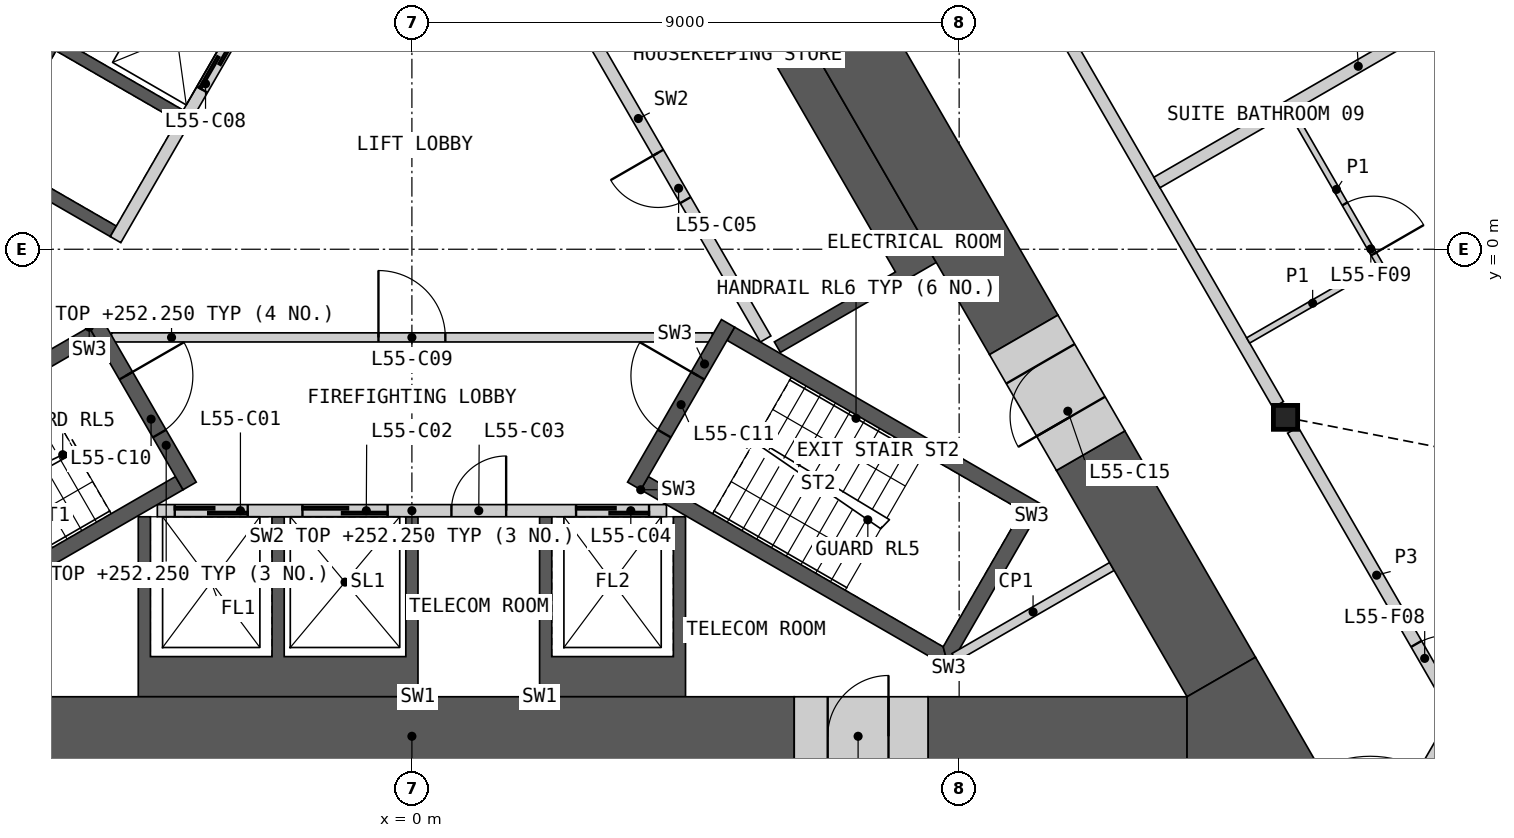
"""IFC4 building model, lengths in metres.
Left out: names, types, materials, properties, quantities, classifications, styles, units other than length and angle.
Written with IfcOpenShell. Run it as: python <this file> out.ifc"""

import sys

from ifc_helpers import new_model, si_unit, direction, frame, frame_2d, origin, origin_2d, place, context, subcontext, project, spatial, polyline, rectangle, i_section, outline, extrude, element, fill, save


model = new_model("IFC4")
c1 = context("Model", 3, precision=1e-05, world=origin(), true_north=direction((0.0, 1.0)))
c2 = subcontext(c1, "Body", "Model", "MODEL_VIEW")
j1 = project(units=[si_unit("LENGTHUNIT", "METRE"), si_unit("PLANEANGLEUNIT", "RADIAN")], contexts=[c1])
p1 = place(None, origin())
s1 = spatial("IfcSite", under=j1, at=p1, CompositionType="ELEMENT")
p2 = place(p1, origin())
s2 = spatial("IfcBuilding", under=s1, at=p2, CompositionType="ELEMENT")
p3 = place(p2, frame((0.0, 0.0, 249.0)))
s3 = spatial("IfcBuildingStorey", under=s2, at=p3, CompositionType="ELEMENT", Elevation=249.0)
p4 = place(p3, frame((14.368, -2.765, 0.0), z_axis=(0.0, 0.0, 1.0), x_axis=(1.0, 0.0, 0.0)))
e1 = element("IfcColumn", 1, at=p4, inside=s3, PredefinedType="COLUMN", context=c2, shape_type="SweptSolid", body=[
    extrude(i_section(OverallWidth=0.399, OverallDepth=0.393, WebThickness=0.023, FlangeThickness=0.037, at=origin_2d()), origin(), (0.0, 0.0, 1.0), 3.6),
])
p5 = place(p3, origin())
e2 = element("IfcWall", 2, at=p5, inside=s3, PredefinedType="SHEAR", context=c2, shape_type="SweptSolid", body=[
    extrude(outline(polyline([(0.1, -7.36), (-4.5, -7.36), (-4.5, -4.4), (-4.3, -4.4), (-4.3, -6.7), (-2.3, -6.7), (-2.3, -4.4), (-2.1, -4.4), (-2.1, -6.7), (-0.1, -6.7), (-0.1, -4.4), (0.1, -4.4), (0.1, -7.36)])), origin(), (0.0, 0.0, 1.0), 3.25),
])
p6 = place(p3, origin())
e3 = element("IfcWall", 3, at=p6, inside=s3, PredefinedType="SHEAR", context=c2, shape_type="SweptSolid", body=[
    extrude(outline(polyline([(2.1, -7.36), (2.1, -4.4), (2.3, -4.4), (2.3, -6.7), (4.3, -6.7), (4.3, -4.4), (4.5, -4.4), (4.5, -7.36), (2.1, -7.36)])), origin(), (0.0, 0.0, 1.0), 3.25),
])
p7 = place(p3, frame((-4.187, -4.3, 0.0), z_axis=(0.0, 0.0, 1.0), x_axis=(1.0, 0.0, 0.0)))
e4 = element("IfcWall", 4, at=p7, inside=s3, PredefinedType="SOLIDWALL", context=c2, shape_type="SweptSolid", body=[
    extrude(rectangle(XDim=8.373, YDim=0.2, at=frame_2d((4.187, 0.0))), origin(), (0.0, 0.0, 1.0), 3.25),
])
p8 = place(p7, frame((0.287, 0.0, 0.0)))
e5 = element("IfcOpeningElement", 5, at=p8, cuts=e4, PredefinedType="OPENING", context=c2, shape_type="SweptSolid", body=[
    extrude(rectangle(XDim=1.2, YDim=2.1, at=frame_2d((0.6, 1.05))), frame((0.0, 0.11, 0.0), z_axis=(0.0, -1.0, 0.0), x_axis=(1.0, 0.0, 0.0)), (0.0, 0.0, 1.0), 0.22),
])
p9 = place(p7, frame((2.387, 0.0, 0.0)))
e6 = element("IfcOpeningElement", 6, at=p9, cuts=e4, PredefinedType="OPENING", context=c2, shape_type="SweptSolid", body=[
    extrude(rectangle(XDim=1.4, YDim=2.1, at=frame_2d((0.7, 1.05))), frame((0.0, 0.11, 0.0), z_axis=(0.0, -1.0, 0.0), x_axis=(1.0, 0.0, 0.0)), (0.0, 0.0, 1.0), 0.22),
])
p10 = place(p7, frame((4.837, 0.0, 0.0)))
e7 = element("IfcOpeningElement", 7, at=p10, cuts=e4, PredefinedType="OPENING", context=c2, shape_type="SweptSolid", body=[
    extrude(rectangle(XDim=0.9, YDim=2.1, at=frame_2d((0.45, 1.05))), frame((0.0, 0.11, 0.0), z_axis=(0.0, -1.0, 0.0), x_axis=(1.0, 0.0, 0.0)), (0.0, 0.0, 1.0), 0.22),
])
p11 = place(p7, frame((6.887, 0.0, 0.0)))
e8 = element("IfcOpeningElement", 8, at=p11, cuts=e4, PredefinedType="OPENING", context=c2, shape_type="SweptSolid", body=[
    extrude(rectangle(XDim=1.2, YDim=2.1, at=frame_2d((0.6, 1.05))), frame((0.0, 0.11, 0.0), z_axis=(0.0, -1.0, 0.0), x_axis=(1.0, 0.0, 0.0)), (0.0, 0.0, 1.0), 0.22),
])
p12 = place(p3, origin())
e9 = element("IfcWall", 9, at=p12, inside=s3, PredefinedType="SHEAR", context=c2, shape_type="SweptSolid", body=[
    extrude(outline(polyline([(4.124, 7.577), (8.624, -0.217), (8.231, -0.444), (6.061, -1.697), (5.96, -1.524), (7.952, -0.374), (4.752, 5.169), (2.76, 4.019), (2.66, 4.192), (4.652, 5.342), (3.652, 7.074), (1.66, 5.924), (1.561, 6.097), (3.731, 7.35), (4.124, 7.577)])), origin(), (0.0, 0.0, 1.0), 3.25),
])
p13 = place(p3, frame((5.817, -1.476, 0.0), z_axis=(0.0, 0.0, 1.0), x_axis=(-0.500002616675, 0.866023893041, 0.0)))
e10 = element("IfcWall", 10, at=p13, inside=s3, PredefinedType="SOLIDWALL", context=c2, shape_type="SweptSolid", body=[
    extrude(rectangle(XDim=8.373, YDim=0.2, at=frame_2d((4.187, 0.0))), origin(), (0.0, 0.0, 1.0), 3.25),
])
p14 = place(p13, frame((2.637, 0.0, 0.0)))
e11 = element("IfcOpeningElement", 11, at=p14, cuts=e10, PredefinedType="OPENING", context=c2, shape_type="SweptSolid", body=[
    extrude(rectangle(XDim=0.9, YDim=2.1, at=frame_2d((0.45, 1.05))), frame((0.0, 0.11, 0.0), z_axis=(0.0, -1.0, 0.0), x_axis=(1.0, 0.0, 0.0)), (0.0, 0.0, 1.0), 0.22),
])
p15 = place(p13, frame((6.937, 0.0, 0.0)))
e12 = element("IfcOpeningElement", 12, at=p15, cuts=e10, PredefinedType="OPENING", context=c2, shape_type="SweptSolid", body=[
    extrude(rectangle(XDim=1.1, YDim=2.1, at=frame_2d((0.55, 1.05))), frame((0.0, 0.11, 0.0), z_axis=(0.0, -1.0, 0.0), x_axis=(1.0, 0.0, 0.0)), (0.0, 0.0, 1.0), 0.22),
])
p16 = place(p3, origin())
e13 = element("IfcWall", 13, at=p16, inside=s3, PredefinedType="SHEAR", context=c2, shape_type="SweptSolid", body=[
    extrude(outline(polyline([(-7.524, 1.688), (-4.124, 7.577), (-3.731, 7.35), (-1.561, 6.097), (-1.66, 5.924), (-3.652, 7.074), (-4.652, 5.342), (-2.66, 4.192), (-2.76, 4.019), (-4.752, 5.169), (-5.752, 3.437), (-3.76, 2.287), (-3.861, 2.113), (-5.852, 3.263), (-6.852, 1.531), (-4.861, 0.381), (-4.96, 0.208), (-7.131, 1.461), (-7.524, 1.688)])), origin(), (0.0, 0.0, 1.0), 3.25),
])
p17 = place(p3, frame((-1.631, 5.776, 0.0), z_axis=(0.0, 0.0, 1.0), x_axis=(-0.499992876559, -0.866029516466, 0.0)))
e14 = element("IfcWall", 14, at=p17, inside=s3, PredefinedType="SOLIDWALL", context=c2, shape_type="SweptSolid", body=[
    extrude(rectangle(XDim=6.486, YDim=0.2, at=frame_2d((3.243, 0.0))), origin(), (0.0, 0.0, 1.0), 3.25),
])
p18 = place(p17, frame((0.337, 0.0, 0.0)))
e15 = element("IfcOpeningElement", 15, at=p18, cuts=e14, PredefinedType="OPENING", context=c2, shape_type="SweptSolid", body=[
    extrude(rectangle(XDim=1.1, YDim=2.1, at=frame_2d((0.55, 1.05))), frame((0.0, 0.11, 0.0), z_axis=(0.0, -1.0, 0.0), x_axis=(1.0, 0.0, 0.0)), (0.0, 0.0, 1.0), 0.22),
])
p19 = place(p17, frame((2.537, 0.0, 0.0)))
e16 = element("IfcOpeningElement", 16, at=p19, cuts=e14, PredefinedType="OPENING", context=c2, shape_type="SweptSolid", body=[
    extrude(rectangle(XDim=1.1, YDim=2.1, at=frame_2d((0.55, 1.05))), frame((0.0, 0.11, 0.0), z_axis=(0.0, -1.0, 0.0), x_axis=(1.0, 0.0, 0.0)), (0.0, 0.0, 1.0), 0.22),
])
p20 = place(p3, frame((-4.941, -1.45, 0.0), z_axis=(0.0, 0.0, 1.0), x_axis=(1.0, 0.0, 0.0)))
e17 = element("IfcWall", 17, at=p20, inside=s3, PredefinedType="PARTITIONING", context=c2, shape_type="SweptSolid", body=[
    extrude(rectangle(XDim=9.882, YDim=0.15, at=frame_2d((4.941, 0.0))), origin(), (0.0, 0.0, 1.0), 3.25),
])
p21 = place(p20, frame((4.391, 0.0, 0.0)))
e18 = element("IfcOpeningElement", 18, at=p21, cuts=e17, PredefinedType="OPENING", context=c2, shape_type="SweptSolid", body=[
    extrude(rectangle(XDim=1.1, YDim=2.1, at=frame_2d((0.55, 1.05))), frame((0.0, 0.085, 0.0), z_axis=(0.0, -1.0, 0.0), x_axis=(1.0, 0.0, 0.0)), (0.0, 0.0, 1.0), 0.17),
])
p22 = place(p3, origin())
e19 = element("IfcWall", 19, at=p22, inside=s3, PredefinedType="SHEAR", context=c2, shape_type="SweptSolid", body=[
    extrude(outline(polyline([(-5.307, -1.281), (-10.374, -4.206), (-10.032, -4.298), (-5.182, -1.498), (-5.307, -1.281)])), origin(), (0.0, 0.0, 1.0), 3.25),
])
p23 = place(p3, origin())
e20 = element("IfcWall", 20, at=p23, inside=s3, PredefinedType="SHEAR", context=c2, shape_type="SweptSolid", body=[
    extrude(outline(polyline([(-8.738, -6.539), (-8.83, -6.881), (-3.763, -3.956), (-3.888, -3.739), (-8.738, -6.539)])), origin(), (0.0, 0.0, 1.0), 3.25),
])
p24 = place(p3, frame((-5.199, -1.219, 0.0), z_axis=(0.0, 0.0, 1.0), x_axis=(0.499982516597, -0.866035497597, 0.0)))
e21 = element("IfcWall", 21, at=p24, inside=s3, PredefinedType="SHEAR", context=c2, shape_type="SweptSolid", body=[
    extrude(rectangle(XDim=3.088, YDim=0.25, at=frame_2d((1.544, 0.0))), origin(), (0.0, 0.0, 1.0), 3.25),
])
p25 = place(p24, frame((0.994, 0.0, 0.0)))
e22 = element("IfcOpeningElement", 22, at=p25, cuts=e21, PredefinedType="OPENING", context=c2, shape_type="SweptSolid", body=[
    extrude(rectangle(XDim=1.1, YDim=2.1, at=frame_2d((0.55, 1.05))), frame((0.0, 0.135, 0.0), z_axis=(0.0, -1.0, 0.0), x_axis=(1.0, 0.0, 0.0)), (0.0, 0.0, 1.0), 0.27),
])
p26 = place(p3, origin())
e23 = element("IfcWall", 23, at=p26, inside=s3, PredefinedType="SHEAR", context=c2, shape_type="SweptSolid", body=[
    extrude(outline(polyline([(3.763, -3.956), (8.83, -6.881), (8.738, -6.539), (3.888, -3.739), (3.763, -3.956)])), origin(), (0.0, 0.0, 1.0), 3.25),
])
p27 = place(p3, origin())
e24 = element("IfcWall", 24, at=p27, inside=s3, PredefinedType="SHEAR", context=c2, shape_type="SweptSolid", body=[
    extrude(outline(polyline([(8.83, -6.881), (10.374, -4.206), (10.032, -4.298), (8.738, -6.539), (8.83, -6.881)])), origin(), (0.0, 0.0, 1.0), 3.25),
])
p28 = place(p3, origin())
e25 = element("IfcWall", 25, at=p28, inside=s3, PredefinedType="SHEAR", context=c2, shape_type="SweptSolid", body=[
    extrude(outline(polyline([(10.032, -4.298), (10.374, -4.206), (5.307, -1.281), (5.182, -1.498), (10.032, -4.298)])), origin(), (0.0, 0.0, 1.0), 3.25),
])
p29 = place(p3, frame((3.655, -3.893, 0.0), z_axis=(0.0, 0.0, 1.0), x_axis=(0.499982516597, 0.866035497597, 0.0)))
e26 = element("IfcWall", 26, at=p29, inside=s3, PredefinedType="SHEAR", context=c2, shape_type="SweptSolid", body=[
    extrude(rectangle(XDim=3.088, YDim=0.25, at=frame_2d((1.544, 0.0))), origin(), (0.0, 0.0, 1.0), 3.25),
])
p30 = place(p29, frame((0.994, 0.0, 0.0)))
e27 = element("IfcOpeningElement", 27, at=p30, cuts=e26, PredefinedType="OPENING", context=c2, shape_type="SweptSolid", body=[
    extrude(rectangle(XDim=1.1, YDim=2.1, at=frame_2d((0.55, 1.05))), frame((0.0, 0.135, 0.0), z_axis=(0.0, -1.0, 0.0), x_axis=(1.0, 0.0, 0.0)), (0.0, 0.0, 1.0), 0.27),
])
p31 = place(p3, frame((11.511, -5.218, 0.0), z_axis=(0.0, 0.0, 1.0), x_axis=(-0.866045649925, -0.499964931016, 0.0)))
e28 = element("IfcWall", 28, at=p31, inside=s3, PredefinedType="PARTITIONING", context=c2, shape_type="SweptSolid", body=[
    extrude(rectangle(XDim=2.992, YDim=0.15, at=frame_2d((1.496, 0.0))), origin(), (0.0, 0.0, 1.0), 3.25),
])
p32 = place(p3, frame((-6.288, -8.01, 0.0), z_axis=(0.0, 0.0, 1.0), x_axis=(1.0, 0.0, 0.0)))
e29 = element("IfcWall", 29, at=p32, inside=s3, PredefinedType="SHEAR", context=c2, shape_type="SweptSolid", body=[
    extrude(rectangle(XDim=12.576, YDim=1.3, at=frame_2d((6.288, 0.0))), origin(), (0.0, 0.0, 1.0), 3.25),
])
p33 = place(p3, frame((8.488, -8.01, 0.0), z_axis=(0.0, 0.0, 1.0), x_axis=(1.0, 0.0, 0.0)))
e30 = element("IfcWall", 30, at=p33, inside=s3, PredefinedType="SHEAR", context=c2, shape_type="SweptSolid", body=[
    extrude(rectangle(XDim=4.26, YDim=1.3, at=frame_2d((2.13, 0.0))), origin(), (0.0, 0.0, 1.0), 3.25),
])
p34 = place(p3, frame((10.062, -1.408, 0.0), z_axis=(0.0, 0.0, 1.0), x_axis=(-0.500000545805, 0.866025088663, 0.0)))
e31 = element("IfcWall", 31, at=p34, inside=s3, PredefinedType="SHEAR", context=c2, shape_type="SweptSolid", body=[
    extrude(rectangle(XDim=12.539, YDim=1.3, at=frame_2d((6.27, 0.0))), origin(), (0.0, 0.0, 1.0), 3.25),
])
p35 = place(p3, frame((13.311, -7.035, 0.0), z_axis=(0.0, 0.0, 1.0), x_axis=(-0.500012574659, 0.86601814368, 0.0)))
e32 = element("IfcWall", 32, at=p35, inside=s3, PredefinedType="SHEAR", context=c2, shape_type="SweptSolid", body=[
    extrude(rectangle(XDim=4.298, YDim=1.3, at=frame_2d((2.149, 0.0))), origin(), (0.0, 0.0, 1.0), 3.25),
])
p36 = place(p3, frame((-3.812, 9.418, 0.0), z_axis=(0.0, 0.0, 1.0), x_axis=(-0.499995037753, -0.86602826872, 0.0)))
e33 = element("IfcWall", 33, at=p36, inside=s3, PredefinedType="SHEAR", context=c2, shape_type="SweptSolid", body=[
    extrude(rectangle(XDim=8.451, YDim=1.3, at=frame_2d((4.225, 0.0))), origin(), (0.0, 0.0, 1.0), 3.25),
])
p37 = place(p3, origin())
e34 = element("IfcWall", 34, at=p37, inside=s3, PredefinedType="SHEAR", context=c2, shape_type="SweptSolid", body=[
    extrude(outline(polyline([(12.748, -8.66), (12.748, -7.36), (13.874, -6.71), (15.0, -8.66), (12.748, -8.66)])), origin(), (0.0, 0.0, 1.0), 3.25),
])
p38 = place(p3, frame((6.288, -8.01, 0.0), z_axis=(0.0, 0.0, 1.0), x_axis=(1.0, 0.0, 0.0)))
e35 = element("IfcWall", 35, at=p38, inside=s3, PredefinedType="SHEAR", context=c2, shape_type="SweptSolid", body=[
    extrude(rectangle(XDim=2.2, YDim=1.3, at=frame_2d((1.1, 0.0))), origin(), (0.0, 0.0, 1.0), 3.25),
])
p39 = place(p38, frame((0.55, 0.0, 0.0)))
e36 = element("IfcOpeningElement", 36, at=p39, cuts=e35, PredefinedType="OPENING", context=c2, shape_type="SweptSolid", body=[
    extrude(rectangle(XDim=1.0, YDim=2.1, at=frame_2d((0.5, 1.05))), frame((0.0, 0.66, 0.0), z_axis=(0.0, -1.0, 0.0), x_axis=(1.0, 0.0, 0.0)), (0.0, 0.0, 1.0), 1.32),
])
p40 = place(p3, frame((11.163, -3.313, 0.0), z_axis=(0.0, 0.0, 1.0), x_axis=(-0.50002983664, 0.866008176907, 0.0)))
e37 = element("IfcWall", 37, at=p40, inside=s3, PredefinedType="SHEAR", context=c2, shape_type="SweptSolid", body=[
    extrude(rectangle(XDim=2.2, YDim=1.3, at=frame_2d((1.1, 0.0))), origin(), (0.0, 0.0, 1.0), 3.25),
])
p41 = place(p40, frame((0.65, 0.0, 0.0)))
e38 = element("IfcOpeningElement", 38, at=p41, cuts=e37, PredefinedType="OPENING", context=c2, shape_type="SweptSolid", body=[
    extrude(rectangle(XDim=1.0, YDim=2.1, at=frame_2d((0.5, 1.05))), frame((0.0, 0.66, 0.0), z_axis=(0.0, -1.0, 0.0), x_axis=(1.0, 0.0, 0.0)), (0.0, 0.0, 1.0), 1.32),
])
p42 = place(p3, frame((9.699, 5.321, 0.0), z_axis=(0.0, 0.0, 1.0), x_axis=(0.49998193945, -0.866035830797, 0.0)))
e39 = element("IfcWall", 39, at=p42, inside=s3, PredefinedType="PARTITIONING", context=c2, shape_type="SweptSolid", body=[
    extrude(rectangle(XDim=9.094, YDim=0.2, at=frame_2d((4.547, 0.0))), origin(), (0.0, 0.0, 1.0), 3.25),
])
p43 = place(p3, frame((14.489, -2.975, 0.0), z_axis=(0.0, 0.0, 1.0), x_axis=(0.500017753321, -0.866015153657, 0.0)))
e40 = element("IfcWall", 40, at=p43, inside=s3, PredefinedType="PARTITIONING", context=c2, shape_type="SweptSolid", body=[
    extrude(rectangle(XDim=5.51, YDim=0.2, at=frame_2d((2.755, 0.0))), origin(), (0.0, 0.0, 1.0), 3.25),
])
p44 = place(p43, frame((4.06, 0.0, 0.0)))
e41 = element("IfcOpeningElement", 41, at=p44, cuts=e40, PredefinedType="OPENING", context=c2, shape_type="SweptSolid", body=[
    extrude(rectangle(XDim=1.1, YDim=2.1, at=frame_2d((0.55, 1.05))), frame((0.0, 0.11, 0.0), z_axis=(0.0, -1.0, 0.0), x_axis=(1.0, 0.0, 0.0)), (0.0, 0.0, 1.0), 0.22),
])
p45 = place(p3, frame((15.231, -11.06, 0.0), z_axis=(0.0, 0.0, 1.0), x_axis=(0.499961815444, 0.866047448526, 0.0)))
e42 = element("IfcWall", 42, at=p45, inside=s3, PredefinedType="PARTITIONING", context=c2, shape_type="SweptSolid", body=[
    extrude(rectangle(XDim=3.826, YDim=0.2, at=frame_2d((1.913, 0.0))), origin(), (0.0, 0.0, 1.0), 3.25),
])
p46 = place(p45, frame((1.064, 0.0, 0.0)))
e43 = element("IfcOpeningElement", 43, at=p46, cuts=e42, PredefinedType="OPENING", context=c2, shape_type="SweptSolid", body=[
    extrude(rectangle(XDim=1.8, YDim=2.1, at=frame_2d((0.9, 1.05))), frame((0.0, 0.11, 0.0), z_axis=(0.0, -1.0, 0.0), x_axis=(1.0, 0.0, 0.0)), (0.0, 0.0, 1.0), 0.22),
])
p47 = place(p3, frame((12.253, 1.098, 0.0), z_axis=(0.0, 0.0, 1.0), x_axis=(0.866026077102, 0.499998833779, 0.0)))
e44 = element("IfcWall", 44, at=p47, inside=s3, PredefinedType="PARTITIONING", context=c2, shape_type="SweptSolid", body=[
    extrude(rectangle(XDim=7.646, YDim=0.2, at=frame_2d((3.823, 0.0))), origin(), (0.0, 0.0, 1.0), 2.404),
])
p48 = place(p3, frame((14.468, 2.261, 0.0), z_axis=(0.0, 0.0, 1.0), x_axis=(0.500037662692, -0.866003658127, 0.0)))
e45 = element("IfcWall", 45, at=p48, inside=s3, PredefinedType="PARTITIONING", context=c2, shape_type="SweptSolid", body=[
    extrude(rectangle(XDim=2.95, YDim=0.1, at=frame_2d((1.475, 0.0))), origin(), (0.0, 0.0, 1.0), 2.404),
])
p49 = place(p48, frame((1.75, 0.0, 0.0)))
e46 = element("IfcOpeningElement", 46, at=p49, cuts=e45, PredefinedType="OPENING", context=c2, shape_type="SweptSolid", body=[
    extrude(rectangle(XDim=0.95, YDim=2.1, at=frame_2d((0.475, 1.05))), frame((0.0, 0.06, 0.0), z_axis=(0.0, -1.0, 0.0), x_axis=(1.0, 0.0, 0.0)), (0.0, 0.0, 1.0), 0.12),
])
p50 = place(p3, frame((13.753, -1.5, 0.0), z_axis=(0.0, 0.0, 1.0), x_axis=(0.866014668023, 0.500018594424, 0.0)))
e47 = element("IfcWall", 47, at=p50, inside=s3, PredefinedType="PARTITIONING", context=c2, shape_type="SweptSolid", body=[
    extrude(rectangle(XDim=2.45, YDim=0.1, at=frame_2d((1.225, 0.0))), origin(), (0.0, 0.0, 1.0), 2.404),
])
p51 = place(p8, origin())
e48 = element("IfcDoor", 48, at=p51, inside=s3, OperationType="SLIDING_TO_LEFT", PredefinedType="DOOR", context=c2, shape_type="SweptSolid", body=[
    extrude(rectangle(XDim=1.2, YDim=2.1, at=frame_2d((0.6, 1.05))), frame((0.0, 0.025, 0.0), z_axis=(0.0, -1.0, 0.0), x_axis=(1.0, 0.0, 0.0)), (0.0, 0.0, 1.0), 0.05),
])
fill(e5, e48)
p52 = place(p9, origin())
e49 = element("IfcDoor", 49, at=p52, inside=s3, OperationType="SLIDING_TO_LEFT", PredefinedType="DOOR", context=c2, shape_type="SweptSolid", body=[
    extrude(rectangle(XDim=1.4, YDim=2.1, at=frame_2d((0.7, 1.05))), frame((0.0, 0.025, 0.0), z_axis=(0.0, -1.0, 0.0), x_axis=(1.0, 0.0, 0.0)), (0.0, 0.0, 1.0), 0.05),
])
fill(e6, e49)
p53 = place(p10, origin())
e50 = element("IfcDoor", 50, at=p53, inside=s3, OperationType="SINGLE_SWING_RIGHT", PredefinedType="DOOR", context=c2, shape_type="SweptSolid", body=[
    extrude(rectangle(XDim=0.9, YDim=2.1, at=frame_2d((0.45, 1.05))), frame((0.0, 0.025, 0.0), z_axis=(0.0, -1.0, 0.0), x_axis=(1.0, 0.0, 0.0)), (0.0, 0.0, 1.0), 0.05),
])
fill(e7, e50)
p54 = place(p11, origin())
e51 = element("IfcDoor", 51, at=p54, inside=s3, OperationType="SLIDING_TO_LEFT", PredefinedType="DOOR", context=c2, shape_type="SweptSolid", body=[
    extrude(rectangle(XDim=1.2, YDim=2.1, at=frame_2d((0.6, 1.05))), frame((0.0, 0.025, 0.0), z_axis=(0.0, -1.0, 0.0), x_axis=(1.0, 0.0, 0.0)), (0.0, 0.0, 1.0), 0.05),
])
fill(e8, e51)
p55 = place(p14, origin())
e52 = element("IfcDoor", 52, at=p55, inside=s3, OperationType="SINGLE_SWING_RIGHT", PredefinedType="DOOR", context=c2, shape_type="SweptSolid", body=[
    extrude(rectangle(XDim=0.9, YDim=2.1, at=frame_2d((0.45, 1.05))), frame((0.0, 0.025, 0.0), z_axis=(0.0, -1.0, 0.0), x_axis=(1.0, 0.0, 0.0)), (0.0, 0.0, 1.0), 0.05),
])
fill(e11, e52)
p56 = place(p19, origin())
e53 = element("IfcDoor", 53, at=p56, inside=s3, OperationType="SLIDING_TO_LEFT", PredefinedType="DOOR", context=c2, shape_type="SweptSolid", body=[
    extrude(rectangle(XDim=1.1, YDim=2.1, at=frame_2d((0.55, 1.05))), frame((0.0, 0.025, 0.0), z_axis=(0.0, -1.0, 0.0), x_axis=(1.0, 0.0, 0.0)), (0.0, 0.0, 1.0), 0.05),
])
fill(e16, e53)
p57 = place(p21, origin())
e54 = element("IfcDoor", 54, at=p57, inside=s3, OperationType="SINGLE_SWING_LEFT", PredefinedType="DOOR", context=c2, shape_type="SweptSolid", body=[
    extrude(rectangle(XDim=1.1, YDim=2.1, at=frame_2d((0.55, 1.05))), frame((0.0, 0.025, 0.0), z_axis=(0.0, -1.0, 0.0), x_axis=(1.0, 0.0, 0.0)), (0.0, 0.0, 1.0), 0.05),
])
fill(e18, e54)
p58 = place(p25, origin())
e55 = element("IfcDoor", 55, at=p58, inside=s3, OperationType="SINGLE_SWING_LEFT", PredefinedType="DOOR", context=c2, shape_type="SweptSolid", body=[
    extrude(rectangle(XDim=1.1, YDim=2.1, at=frame_2d((0.55, 1.05))), frame((0.0, 0.025, 0.0), z_axis=(0.0, -1.0, 0.0), x_axis=(1.0, 0.0, 0.0)), (0.0, 0.0, 1.0), 0.05),
])
fill(e22, e55)
p59 = place(p30, origin())
e56 = element("IfcDoor", 56, at=p59, inside=s3, OperationType="SINGLE_SWING_RIGHT", PredefinedType="DOOR", context=c2, shape_type="SweptSolid", body=[
    extrude(rectangle(XDim=1.1, YDim=2.1, at=frame_2d((0.55, 1.05))), frame((0.0, 0.025, 0.0), z_axis=(0.0, -1.0, 0.0), x_axis=(1.0, 0.0, 0.0)), (0.0, 0.0, 1.0), 0.05),
])
fill(e27, e56)
p60 = place(p39, origin())
e57 = element("IfcDoor", 57, at=p60, inside=s3, OperationType="SINGLE_SWING_RIGHT", PredefinedType="DOOR", context=c2, shape_type="SweptSolid", body=[
    extrude(rectangle(XDim=1.0, YDim=2.1, at=frame_2d((0.5, 1.05))), frame((0.0, 0.405, 0.0), z_axis=(0.0, -1.0, 0.0), x_axis=(1.0, 0.0, 0.0)), (0.0, 0.0, 1.0), 0.05),
])
fill(e36, e57)
p61 = place(p41, origin())
e58 = element("IfcDoor", 58, at=p61, inside=s3, OperationType="SINGLE_SWING_LEFT", PredefinedType="DOOR", context=c2, shape_type="SweptSolid", body=[
    extrude(rectangle(XDim=1.0, YDim=2.1, at=frame_2d((0.5, 1.05))), frame((0.0, 0.405, 0.0), z_axis=(0.0, -1.0, 0.0), x_axis=(1.0, 0.0, 0.0)), (0.0, 0.0, 1.0), 0.05),
])
fill(e38, e58)
p62 = place(p44, origin())
e59 = element("IfcDoor", 59, at=p62, inside=s3, OperationType="SINGLE_SWING_RIGHT", PredefinedType="DOOR", context=c2, shape_type="SweptSolid", body=[
    extrude(rectangle(XDim=1.1, YDim=2.1, at=frame_2d((0.55, 1.05))), frame((0.0, 0.025, 0.0), z_axis=(0.0, -1.0, 0.0), x_axis=(1.0, 0.0, 0.0)), (0.0, 0.0, 1.0), 0.05),
])
fill(e41, e59)
p63 = place(p49, origin())
e60 = element("IfcDoor", 60, at=p63, inside=s3, OperationType="SINGLE_SWING_RIGHT", PredefinedType="DOOR", context=c2, shape_type="SweptSolid", body=[
    extrude(rectangle(XDim=0.95, YDim=2.1, at=frame_2d((0.475, 1.05))), frame((0.0, 0.025, 0.0), z_axis=(0.0, -1.0, 0.0), x_axis=(1.0, 0.0, 0.0)), (0.0, 0.0, 1.0), 0.05),
])
fill(e46, e60)
save(model, sys.argv[1])
